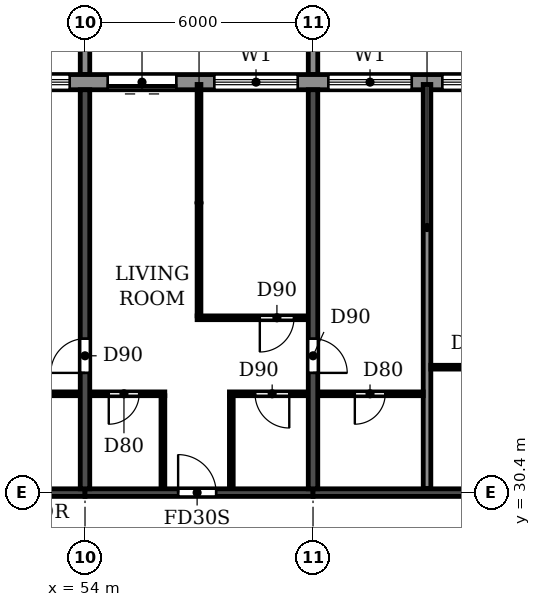
"""IFC4 building model, lengths in metres.
Left out: names, types, materials, properties, quantities, classifications, styles, units other than length and angle.
Written with IfcOpenShell. Run it as: python <this file> out.ifc"""

import sys

from ifc_helpers import new_model, si_unit, direction, frame, frame_2d, origin, place, context, subcontext, project, spatial, polyline, rectangle, outline, extrude, source, transform, mapped, element, fill, save


model = new_model("IFC4")
c1 = context("Model", 3, precision=1e-05, world=origin(), true_north=direction((0.0, 1.0)))
c2 = subcontext(c1, "Body", "Model", "MODEL_VIEW")
j1 = project(units=[si_unit("LENGTHUNIT", "METRE"), si_unit("PLANEANGLEUNIT", "RADIAN")], contexts=[c1])
p1 = place(None, origin())
s1 = spatial("IfcSite", under=j1, at=p1, CompositionType="ELEMENT")
p2 = place(p1, origin())
s2 = spatial("IfcBuilding", under=s1, at=p2, CompositionType="ELEMENT")
p3 = place(p2, frame((0.0, 0.0, 191.7)))
s3 = spatial("IfcBuildingStorey", under=s2, at=p3, CompositionType="ELEMENT", Elevation=191.7)
p4 = place(p3, frame((54.0, 30.5, 0.0), z_axis=(0.0, 0.0, 1.0), x_axis=(0.0, 1.0, 0.0)))
e1 = element("IfcWall", 1, at=p4, inside=s3, PredefinedType="SHEAR", context=c2, shape_type="SweptSolid", body=[
    extrude(rectangle(XDim=10.5, YDim=0.25, at=frame_2d((5.25, 0.0))), origin(), (0.0, 0.0, 1.0), 3.08),
])
p5 = place(p4, frame((3.05, 0.0, 0.0)))
e2 = element("IfcOpeningElement", 2, at=p5, cuts=e1, PredefinedType="OPENING", context=c2, shape_type="SweptSolid", body=[
    extrude(rectangle(XDim=0.9, YDim=2.1, at=frame_2d((0.45, 1.05))), frame((0.0, 0.135, 0.0), z_axis=(0.0, -1.0, 0.0), x_axis=(1.0, 0.0, 0.0)), (0.0, 0.0, 1.0), 0.27),
])
p6 = place(p3, frame((60.0, 30.5, 0.0), z_axis=(0.0, 0.0, 1.0), x_axis=(0.0, 1.0, 0.0)))
e3 = element("IfcWall", 3, at=p6, inside=s3, PredefinedType="SHEAR", context=c2, shape_type="SweptSolid", body=[
    extrude(rectangle(XDim=10.5, YDim=0.25, at=frame_2d((5.25, 0.0))), origin(), (0.0, 0.0, 1.0), 3.08),
])
p7 = place(p6, frame((3.05, 0.0, 0.0)))
e4 = element("IfcOpeningElement", 4, at=p7, cuts=e3, PredefinedType="OPENING", context=c2, shape_type="SweptSolid", body=[
    extrude(rectangle(XDim=0.9, YDim=2.1, at=frame_2d((0.45, 1.05))), frame((0.0, 0.135, 0.0), z_axis=(0.0, -1.0, 0.0), x_axis=(1.0, 0.0, 0.0)), (0.0, 0.0, 1.0), 0.27),
])
p8 = place(p3, frame((48.0, 30.4, 0.0), z_axis=(0.0, 0.0, 1.0), x_axis=(1.0, 0.0, 0.0)))
e5 = element("IfcWall", 5, at=p8, inside=s3, PredefinedType="SHEAR", context=c2, shape_type="SweptSolid", body=[
    extrude(rectangle(XDim=6.0, YDim=0.2, at=frame_2d((3.0, 0.0))), origin(), (0.0, 0.0, 1.0), 2.48),
])
p9 = place(p3, frame((54.0, 30.4, 0.0), z_axis=(0.0, 0.0, 1.0), x_axis=(1.0, 0.0, 0.0)))
e6 = element("IfcWall", 6, at=p9, inside=s3, PredefinedType="SHEAR", context=c2, shape_type="SweptSolid", body=[
    extrude(rectangle(XDim=6.0, YDim=0.2, at=frame_2d((3.0, 0.0))), origin(), (0.0, 0.0, 1.0), 2.48),
])
p10 = place(p9, frame((2.45, 0.0, 0.0)))
e7 = element("IfcOpeningElement", 7, at=p10, cuts=e6, PredefinedType="OPENING", context=c2, shape_type="SweptSolid", body=[
    extrude(rectangle(XDim=1.0, YDim=2.1, at=frame_2d((0.5, 1.05))), frame((0.0, 0.11, 0.0), z_axis=(0.0, -1.0, 0.0), x_axis=(1.0, 0.0, 0.0)), (0.0, 0.0, 1.0), 0.22),
])
p11 = place(p3, frame((60.0, 30.4, 0.0), z_axis=(0.0, 0.0, 1.0), x_axis=(1.0, 0.0, 0.0)))
e8 = element("IfcWall", 8, at=p11, inside=s3, PredefinedType="SHEAR", context=c2, shape_type="SweptSolid", body=[
    extrude(rectangle(XDim=6.0, YDim=0.2, at=frame_2d((3.0, 0.0))), origin(), (0.0, 0.0, 1.0), 2.48),
])
p12 = place(p3, frame((79.317, 41.2, 0.0), z_axis=(0.0, 0.0, 1.0), x_axis=(-1.0, 0.0, 0.0)))
e9 = element("IfcWall", 9, at=p12, inside=s3, PredefinedType="STANDARD", context=c2, shape_type="SweptSolid", body=[
    extrude(rectangle(XDim=56.634, YDim=0.4, at=frame_2d((28.317, 0.0))), origin(), (0.0, 0.0, 1.0), 3.08),
])
p13 = place(p12, frame((52.917, 0.0, 0.0)))
e10 = element("IfcOpeningElement", 10, at=p13, cuts=e9, PredefinedType="OPENING", context=c2, shape_type="SweptSolid", body=[
    extrude(rectangle(XDim=1.8, YDim=2.4, at=frame_2d((0.9, 1.2))), frame((0.0, 0.21, 0.0), z_axis=(0.0, -1.0, 0.0), x_axis=(1.0, 0.0, 0.0)), (0.0, 0.0, 1.0), 0.42),
])
p14 = place(p12, frame((49.717, 0.0, 0.9)))
e11 = element("IfcOpeningElement", 11, at=p14, cuts=e9, PredefinedType="OPENING", context=c2, shape_type="SweptSolid", body=[
    extrude(rectangle(XDim=2.2, YDim=1.5, at=frame_2d((1.1, 0.75))), frame((0.0, 0.21, 0.0), z_axis=(0.0, -1.0, 0.0), x_axis=(1.0, 0.0, 0.0)), (0.0, 0.0, 1.0), 0.42),
])
p15 = place(p12, frame((46.917, 0.0, 0.0)))
e12 = element("IfcOpeningElement", 12, at=p15, cuts=e9, PredefinedType="OPENING", context=c2, shape_type="SweptSolid", body=[
    extrude(rectangle(XDim=1.8, YDim=2.4, at=frame_2d((0.9, 1.2))), frame((0.0, 0.21, 0.0), z_axis=(0.0, -1.0, 0.0), x_axis=(1.0, 0.0, 0.0)), (0.0, 0.0, 1.0), 0.42),
])
p16 = place(p12, frame((43.717, 0.0, 0.9)))
e13 = element("IfcOpeningElement", 13, at=p16, cuts=e9, PredefinedType="OPENING", context=c2, shape_type="SweptSolid", body=[
    extrude(rectangle(XDim=2.2, YDim=1.5, at=frame_2d((1.1, 0.75))), frame((0.0, 0.21, 0.0), z_axis=(0.0, -1.0, 0.0), x_axis=(1.0, 0.0, 0.0)), (0.0, 0.0, 1.0), 0.42),
])
p17 = place(p12, frame((40.717, 0.0, 0.9)))
e14 = element("IfcOpeningElement", 14, at=p17, cuts=e9, PredefinedType="OPENING", context=c2, shape_type="SweptSolid", body=[
    extrude(rectangle(XDim=2.2, YDim=1.5, at=frame_2d((1.1, 0.75))), frame((0.0, 0.21, 0.0), z_axis=(0.0, -1.0, 0.0), x_axis=(1.0, 0.0, 0.0)), (0.0, 0.0, 1.0), 0.42),
])
p18 = place(p12, frame((37.717, 0.0, 0.9)))
e15 = element("IfcOpeningElement", 15, at=p18, cuts=e9, PredefinedType="OPENING", context=c2, shape_type="SweptSolid", body=[
    extrude(rectangle(XDim=2.2, YDim=1.5, at=frame_2d((1.1, 0.75))), frame((0.0, 0.21, 0.0), z_axis=(0.0, -1.0, 0.0), x_axis=(1.0, 0.0, 0.0)), (0.0, 0.0, 1.0), 0.42),
])
p19 = place(p12, frame((34.917, 0.0, 0.0)))
e16 = element("IfcOpeningElement", 16, at=p19, cuts=e9, PredefinedType="OPENING", context=c2, shape_type="SweptSolid", body=[
    extrude(rectangle(XDim=1.8, YDim=2.4, at=frame_2d((0.9, 1.2))), frame((0.0, 0.21, 0.0), z_axis=(0.0, -1.0, 0.0), x_axis=(1.0, 0.0, 0.0)), (0.0, 0.0, 1.0), 0.42),
])
p20 = place(p12, frame((31.717, 0.0, 0.9)))
e17 = element("IfcOpeningElement", 17, at=p20, cuts=e9, PredefinedType="OPENING", context=c2, shape_type="SweptSolid", body=[
    extrude(rectangle(XDim=2.2, YDim=1.5, at=frame_2d((1.1, 0.75))), frame((0.0, 0.21, 0.0), z_axis=(0.0, -1.0, 0.0), x_axis=(1.0, 0.0, 0.0)), (0.0, 0.0, 1.0), 0.42),
])
p21 = place(p12, frame((28.717, 0.0, 0.9)))
e18 = element("IfcOpeningElement", 18, at=p21, cuts=e9, PredefinedType="OPENING", context=c2, shape_type="SweptSolid", body=[
    extrude(rectangle(XDim=2.2, YDim=1.5, at=frame_2d((1.1, 0.75))), frame((0.0, 0.21, 0.0), z_axis=(0.0, -1.0, 0.0), x_axis=(1.0, 0.0, 0.0)), (0.0, 0.0, 1.0), 0.42),
])
p22 = place(p12, frame((25.717, 0.0, 0.9)))
e19 = element("IfcOpeningElement", 19, at=p22, cuts=e9, PredefinedType="OPENING", context=c2, shape_type="SweptSolid", body=[
    extrude(rectangle(XDim=2.2, YDim=1.5, at=frame_2d((1.1, 0.75))), frame((0.0, 0.21, 0.0), z_axis=(0.0, -1.0, 0.0), x_axis=(1.0, 0.0, 0.0)), (0.0, 0.0, 1.0), 0.42),
])
p23 = place(p12, frame((22.917, 0.0, 0.0)))
e20 = element("IfcOpeningElement", 20, at=p23, cuts=e9, PredefinedType="OPENING", context=c2, shape_type="SweptSolid", body=[
    extrude(rectangle(XDim=1.8, YDim=2.4, at=frame_2d((0.9, 1.2))), frame((0.0, 0.21, 0.0), z_axis=(0.0, -1.0, 0.0), x_axis=(1.0, 0.0, 0.0)), (0.0, 0.0, 1.0), 0.42),
])
p24 = place(p12, frame((19.717, 0.0, 0.9)))
e21 = element("IfcOpeningElement", 21, at=p24, cuts=e9, PredefinedType="OPENING", context=c2, shape_type="SweptSolid", body=[
    extrude(rectangle(XDim=2.2, YDim=1.5, at=frame_2d((1.1, 0.75))), frame((0.0, 0.21, 0.0), z_axis=(0.0, -1.0, 0.0), x_axis=(1.0, 0.0, 0.0)), (0.0, 0.0, 1.0), 0.42),
])
p25 = place(p12, frame((16.717, 0.0, 0.9)))
e22 = element("IfcOpeningElement", 22, at=p25, cuts=e9, PredefinedType="OPENING", context=c2, shape_type="SweptSolid", body=[
    extrude(rectangle(XDim=2.2, YDim=1.5, at=frame_2d((1.1, 0.75))), frame((0.0, 0.21, 0.0), z_axis=(0.0, -1.0, 0.0), x_axis=(1.0, 0.0, 0.0)), (0.0, 0.0, 1.0), 0.42),
])
p26 = place(p12, frame((13.717, 0.0, 0.9)))
e23 = element("IfcOpeningElement", 23, at=p26, cuts=e9, PredefinedType="OPENING", context=c2, shape_type="SweptSolid", body=[
    extrude(rectangle(XDim=2.2, YDim=1.5, at=frame_2d((1.1, 0.75))), frame((0.0, 0.21, 0.0), z_axis=(0.0, -1.0, 0.0), x_axis=(1.0, 0.0, 0.0)), (0.0, 0.0, 1.0), 0.42),
])
p27 = place(p12, frame((10.717, 0.0, 0.9)))
e24 = element("IfcOpeningElement", 24, at=p27, cuts=e9, PredefinedType="OPENING", context=c2, shape_type="SweptSolid", body=[
    extrude(rectangle(XDim=2.2, YDim=1.5, at=frame_2d((1.1, 0.75))), frame((0.0, 0.21, 0.0), z_axis=(0.0, -1.0, 0.0), x_axis=(1.0, 0.0, 0.0)), (0.0, 0.0, 1.0), 0.42),
])
p28 = place(p12, frame((7.917, 0.0, 0.0)))
e25 = element("IfcOpeningElement", 25, at=p28, cuts=e9, PredefinedType="OPENING", context=c2, shape_type="SweptSolid", body=[
    extrude(rectangle(XDim=1.8, YDim=2.4, at=frame_2d((0.9, 1.2))), frame((0.0, 0.21, 0.0), z_axis=(0.0, -1.0, 0.0), x_axis=(1.0, 0.0, 0.0)), (0.0, 0.0, 1.0), 0.42),
])
p29 = place(p12, frame((4.717, 0.0, 0.9)))
e26 = element("IfcOpeningElement", 26, at=p29, cuts=e9, PredefinedType="OPENING", context=c2, shape_type="SweptSolid", body=[
    extrude(rectangle(XDim=2.2, YDim=1.5, at=frame_2d((1.1, 0.75))), frame((0.0, 0.21, 0.0), z_axis=(0.0, -1.0, 0.0), x_axis=(1.0, 0.0, 0.0)), (0.0, 0.0, 1.0), 0.42),
])
p30 = place(p12, frame((1.917, 0.0, 0.0)))
e27 = element("IfcOpeningElement", 27, at=p30, cuts=e9, PredefinedType="OPENING", context=c2, shape_type="SweptSolid", body=[
    extrude(rectangle(XDim=1.8, YDim=2.4, at=frame_2d((0.9, 1.2))), frame((0.0, 0.21, 0.0), z_axis=(0.0, -1.0, 0.0), x_axis=(1.0, 0.0, 0.0)), (0.0, 0.0, 1.0), 0.42),
])
m1 = source(origin(), c2, "Body", "SweptSolid", [
    extrude(outline(polyline([(0.0, 0.0), (0.25, 0.0), (0.25, 3.1), (0.0, 3.1), (0.0, 0.0)])), origin(), (0.0, 0.0, 1.0), 3.1),
])
for number, where in (
    (28, (53.875, 41.4, 0.0)),
    (29, (59.875, 41.4, 0.0)),
):
    element("IfcWall", number, at=place(p3, frame(where)), inside=s3, PredefinedType="STANDARD", context=c2, shape_type="MappedRepresentation", body=[
        mapped(m1, transform((0.0, 0.0, 0.0))),
    ])
p31 = place(p3, frame((63.0, 30.51, 0.0), z_axis=(0.0, 0.0, 1.0), x_axis=(0.0, 1.0, 0.0)))
e30 = element("IfcWall", 30, at=p31, inside=s3, PredefinedType="PARTITIONING", context=c2, shape_type="SweptSolid", body=[
    extrude(rectangle(XDim=10.63, YDim=0.2, at=frame_2d((5.315, 0.0))), origin(), (0.0, 0.0, 1.0), 3.08),
])
p32 = place(p3, frame((48.135, 33.0, 0.0), z_axis=(0.0, 0.0, 1.0), x_axis=(1.0, 0.0, 0.0)))
e31 = element("IfcWall", 31, at=p32, inside=s3, PredefinedType="PARTITIONING", context=c2, shape_type="SweptSolid", body=[
    extrude(rectangle(XDim=5.73, YDim=0.1, at=frame_2d((2.865, 0.0))), origin(), (0.0, 0.0, 1.0), 3.08),
])
p33 = place(p32, frame((0.965, 0.0, 0.0)))
e32 = element("IfcOpeningElement", 32, at=p33, cuts=e31, PredefinedType="OPENING", context=c2, shape_type="SweptSolid", body=[
    extrude(rectangle(XDim=0.8, YDim=2.1, at=frame_2d((0.4, 1.05))), frame((0.0, 0.06, 0.0), z_axis=(0.0, -1.0, 0.0), x_axis=(1.0, 0.0, 0.0)), (0.0, 0.0, 1.0), 0.12),
])
p34 = place(p32, frame((3.965, 0.0, 0.0)))
e33 = element("IfcOpeningElement", 33, at=p34, cuts=e31, PredefinedType="OPENING", context=c2, shape_type="SweptSolid", body=[
    extrude(rectangle(XDim=0.8, YDim=2.1, at=frame_2d((0.4, 1.05))), frame((0.0, 0.06, 0.0), z_axis=(0.0, -1.0, 0.0), x_axis=(1.0, 0.0, 0.0)), (0.0, 0.0, 1.0), 0.12),
])
p35 = place(p3, frame((54.135, 33.0, 0.0), z_axis=(0.0, 0.0, 1.0), x_axis=(1.0, 0.0, 0.0)))
e34 = element("IfcWall", 34, at=p35, inside=s3, PredefinedType="PARTITIONING", context=c2, shape_type="SweptSolid", body=[
    extrude(rectangle(XDim=1.965, YDim=0.1, at=frame_2d((0.982, 0.0))), origin(), (0.0, 0.0, 1.0), 3.08),
])
p36 = place(p35, frame((0.49, 0.0, 0.0)))
e35 = element("IfcOpeningElement", 35, at=p36, cuts=e34, PredefinedType="OPENING", context=c2, shape_type="SweptSolid", body=[
    extrude(rectangle(XDim=0.8, YDim=2.1, at=frame_2d((0.4, 1.05))), frame((0.0, 0.06, 0.0), z_axis=(0.0, -1.0, 0.0), x_axis=(1.0, 0.0, 0.0)), (0.0, 0.0, 1.0), 0.12),
])
p37 = place(p3, frame((57.8, 33.0, 0.0), z_axis=(0.0, 0.0, 1.0), x_axis=(1.0, 0.0, 0.0)))
e36 = element("IfcWall", 36, at=p37, inside=s3, PredefinedType="PARTITIONING", context=c2, shape_type="SweptSolid", body=[
    extrude(rectangle(XDim=2.065, YDim=0.1, at=frame_2d((1.032, 0.0))), origin(), (0.0, 0.0, 1.0), 3.08),
])
p38 = place(p37, frame((0.675, 0.0, 0.0)))
e37 = element("IfcOpeningElement", 37, at=p38, cuts=e36, PredefinedType="OPENING", context=c2, shape_type="SweptSolid", body=[
    extrude(rectangle(XDim=0.9, YDim=2.1, at=frame_2d((0.45, 1.05))), frame((0.0, 0.06, 0.0), z_axis=(0.0, -1.0, 0.0), x_axis=(1.0, 0.0, 0.0)), (0.0, 0.0, 1.0), 0.12),
])
p39 = place(p3, frame((60.135, 33.0, 0.0), z_axis=(0.0, 0.0, 1.0), x_axis=(1.0, 0.0, 0.0)))
e38 = element("IfcWall", 38, at=p39, inside=s3, PredefinedType="PARTITIONING", context=c2, shape_type="SweptSolid", body=[
    extrude(rectangle(XDim=2.765, YDim=0.1, at=frame_2d((1.382, 0.0))), origin(), (0.0, 0.0, 1.0), 3.08),
])
p40 = place(p39, frame((0.965, 0.0, 0.0)))
e39 = element("IfcOpeningElement", 39, at=p40, cuts=e38, PredefinedType="OPENING", context=c2, shape_type="SweptSolid", body=[
    extrude(rectangle(XDim=0.8, YDim=2.1, at=frame_2d((0.4, 1.05))), frame((0.0, 0.06, 0.0), z_axis=(0.0, -1.0, 0.0), x_axis=(1.0, 0.0, 0.0)), (0.0, 0.0, 1.0), 0.12),
])
p41 = place(p3, frame((63.1, 33.7, 0.0), z_axis=(0.0, 0.0, 1.0), x_axis=(1.0, 0.0, 0.0)))
e40 = element("IfcWall", 40, at=p41, inside=s3, PredefinedType="PARTITIONING", context=c2, shape_type="SweptSolid", body=[
    extrude(rectangle(XDim=2.765, YDim=0.1, at=frame_2d((1.382, 0.0))), origin(), (0.0, 0.0, 1.0), 3.08),
])
p42 = place(p41, frame((1.0, 0.0, 0.0)))
e41 = element("IfcOpeningElement", 41, at=p42, cuts=e40, PredefinedType="OPENING", context=c2, shape_type="SweptSolid", body=[
    extrude(rectangle(XDim=0.8, YDim=2.1, at=frame_2d((0.4, 1.05))), frame((0.0, 0.06, 0.0), z_axis=(0.0, -1.0, 0.0), x_axis=(1.0, 0.0, 0.0)), (0.0, 0.0, 1.0), 0.12),
])
p43 = place(p3, frame((56.95, 35.0, 0.0), z_axis=(0.0, 0.0, 1.0), x_axis=(1.0, 0.0, 0.0)))
e42 = element("IfcWall", 42, at=p43, inside=s3, PredefinedType="PARTITIONING", context=c2, shape_type="SweptSolid", body=[
    extrude(rectangle(XDim=2.915, YDim=0.1, at=frame_2d((1.458, 0.0))), origin(), (0.0, 0.0, 1.0), 3.08),
])
p44 = place(p43, frame((1.65, 0.0, 0.0)))
e43 = element("IfcOpeningElement", 43, at=p44, cuts=e42, PredefinedType="OPENING", context=c2, shape_type="SweptSolid", body=[
    extrude(rectangle(XDim=0.9, YDim=2.1, at=frame_2d((0.45, 1.05))), frame((0.0, 0.06, 0.0), z_axis=(0.0, -1.0, 0.0), x_axis=(1.0, 0.0, 0.0)), (0.0, 0.0, 1.0), 0.12),
])
p45 = place(p3, frame((56.05, 30.51, 0.0), z_axis=(0.0, 0.0, 1.0), x_axis=(0.0, 1.0, 0.0)))
e44 = element("IfcWall", 44, at=p45, inside=s3, PredefinedType="PARTITIONING", context=c2, shape_type="SweptSolid", body=[
    extrude(rectangle(XDim=2.44, YDim=0.1, at=frame_2d((1.22, 0.0))), origin(), (0.0, 0.0, 1.0), 3.08),
])
p46 = place(p3, frame((57.0, 35.05, 0.0), z_axis=(0.0, 0.0, 1.0), x_axis=(0.0, 1.0, 0.0)))
e45 = element("IfcWall", 45, at=p46, inside=s3, PredefinedType="PARTITIONING", context=c2, shape_type="SweptSolid", body=[
    extrude(rectangle(XDim=6.09, YDim=0.1, at=frame_2d((3.045, 0.0))), origin(), (0.0, 0.0, 1.0), 3.08),
])
p47 = place(p3, frame((57.85, 30.51, 0.0), z_axis=(0.0, 0.0, 1.0), x_axis=(0.0, 1.0, 0.0)))
e46 = element("IfcWall", 46, at=p47, inside=s3, PredefinedType="PARTITIONING", context=c2, shape_type="SweptSolid", body=[
    extrude(rectangle(XDim=2.44, YDim=0.1, at=frame_2d((1.22, 0.0))), origin(), (0.0, 0.0, 1.0), 3.08),
])
p48 = place(p22, origin())
e47 = element("IfcWindow", 47, at=p48, inside=s3, PartitioningType="DOUBLE_PANEL_HORIZONTAL", PredefinedType="WINDOW", context=c2, shape_type="SweptSolid", body=[
    extrude(rectangle(XDim=2.2, YDim=1.5, at=frame_2d((1.1, 0.75))), frame((0.0, 0.03, 0.0), z_axis=(0.0, -1.0, 0.0), x_axis=(1.0, 0.0, 0.0)), (0.0, 0.0, 1.0), 0.06),
])
fill(e19, e47)
p49 = place(p23, origin())
e48 = element("IfcDoor", 48, at=p49, inside=s3, OperationType="DOUBLE_DOOR_SLIDING", PredefinedType="DOOR", context=c2, shape_type="SweptSolid", body=[
    extrude(rectangle(XDim=1.8, YDim=2.4, at=frame_2d((0.9, 1.2))), frame((0.0, 0.025, 0.0), z_axis=(0.0, -1.0, 0.0), x_axis=(1.0, 0.0, 0.0)), (0.0, 0.0, 1.0), 0.05),
])
fill(e20, e48)
p50 = place(p24, origin())
e49 = element("IfcWindow", 49, at=p50, inside=s3, PartitioningType="DOUBLE_PANEL_HORIZONTAL", PredefinedType="WINDOW", context=c2, shape_type="SweptSolid", body=[
    extrude(rectangle(XDim=2.2, YDim=1.5, at=frame_2d((1.1, 0.75))), frame((0.0, 0.03, 0.0), z_axis=(0.0, -1.0, 0.0), x_axis=(1.0, 0.0, 0.0)), (0.0, 0.0, 1.0), 0.06),
])
fill(e21, e49)
p51 = place(p25, origin())
e50 = element("IfcWindow", 50, at=p51, inside=s3, PartitioningType="DOUBLE_PANEL_HORIZONTAL", PredefinedType="WINDOW", context=c2, shape_type="SweptSolid", body=[
    extrude(rectangle(XDim=2.2, YDim=1.5, at=frame_2d((1.1, 0.75))), frame((0.0, 0.03, 0.0), z_axis=(0.0, -1.0, 0.0), x_axis=(1.0, 0.0, 0.0)), (0.0, 0.0, 1.0), 0.06),
])
fill(e22, e50)
p52 = place(p26, origin())
e51 = element("IfcWindow", 51, at=p52, inside=s3, PartitioningType="DOUBLE_PANEL_HORIZONTAL", PredefinedType="WINDOW", context=c2, shape_type="SweptSolid", body=[
    extrude(rectangle(XDim=2.2, YDim=1.5, at=frame_2d((1.1, 0.75))), frame((0.0, 0.03, 0.0), z_axis=(0.0, -1.0, 0.0), x_axis=(1.0, 0.0, 0.0)), (0.0, 0.0, 1.0), 0.06),
])
fill(e23, e51)
p53 = place(p40, frame((0.8, 0.0, 0.0), z_axis=(0.0, 0.0, 1.0), x_axis=(-1.0, 0.0, 0.0)))
e52 = element("IfcDoor", 52, at=p53, inside=s3, OperationType="SINGLE_SWING_RIGHT", PredefinedType="DOOR", context=c2, shape_type="SweptSolid", body=[
    extrude(rectangle(XDim=0.8, YDim=2.1, at=frame_2d((0.4, 1.05))), frame((0.0, 0.025, 0.0), z_axis=(0.0, -1.0, 0.0), x_axis=(1.0, 0.0, 0.0)), (0.0, 0.0, 1.0), 0.05),
])
fill(e39, e52)
p54 = place(p5, origin())
e53 = element("IfcDoor", 53, at=p54, inside=s3, OperationType="SINGLE_SWING_LEFT", PredefinedType="DOOR", context=c2, shape_type="SweptSolid", body=[
    extrude(rectangle(XDim=0.9, YDim=2.1, at=frame_2d((0.45, 1.05))), frame((0.0, 0.025, 0.0), z_axis=(0.0, -1.0, 0.0), x_axis=(1.0, 0.0, 0.0)), (0.0, 0.0, 1.0), 0.05),
])
fill(e2, e53)
p55 = place(p36, frame((0.8, 0.0, 0.0), z_axis=(0.0, 0.0, 1.0), x_axis=(-1.0, 0.0, 0.0)))
e54 = element("IfcDoor", 54, at=p55, inside=s3, OperationType="SINGLE_SWING_RIGHT", PredefinedType="DOOR", context=c2, shape_type="SweptSolid", body=[
    extrude(rectangle(XDim=0.8, YDim=2.1, at=frame_2d((0.4, 1.05))), frame((0.0, 0.025, 0.0), z_axis=(0.0, -1.0, 0.0), x_axis=(1.0, 0.0, 0.0)), (0.0, 0.0, 1.0), 0.05),
])
fill(e35, e54)
p56 = place(p10, origin())
e55 = element("IfcDoor", 55, at=p56, inside=s3, OperationType="SINGLE_SWING_LEFT", PredefinedType="DOOR", context=c2, shape_type="SweptSolid", body=[
    extrude(rectangle(XDim=1.0, YDim=2.1, at=frame_2d((0.5, 1.05))), frame((0.0, 0.025, 0.0), z_axis=(0.0, -1.0, 0.0), x_axis=(1.0, 0.0, 0.0)), (0.0, 0.0, 1.0), 0.05),
])
fill(e7, e55)
p57 = place(p38, frame((0.9, 0.0, 0.0), z_axis=(0.0, 0.0, 1.0), x_axis=(-1.0, 0.0, 0.0)))
e56 = element("IfcDoor", 56, at=p57, inside=s3, OperationType="SINGLE_SWING_LEFT", PredefinedType="DOOR", context=c2, shape_type="SweptSolid", body=[
    extrude(rectangle(XDim=0.9, YDim=2.1, at=frame_2d((0.45, 1.05))), frame((0.0, 0.025, 0.0), z_axis=(0.0, -1.0, 0.0), x_axis=(1.0, 0.0, 0.0)), (0.0, 0.0, 1.0), 0.05),
])
fill(e37, e56)
p58 = place(p44, frame((0.9, 0.0, 0.0), z_axis=(0.0, 0.0, 1.0), x_axis=(-1.0, 0.0, 0.0)))
e57 = element("IfcDoor", 57, at=p58, inside=s3, OperationType="SINGLE_SWING_RIGHT", PredefinedType="DOOR", context=c2, shape_type="SweptSolid", body=[
    extrude(rectangle(XDim=0.9, YDim=2.1, at=frame_2d((0.45, 1.05))), frame((0.0, 0.025, 0.0), z_axis=(0.0, -1.0, 0.0), x_axis=(1.0, 0.0, 0.0)), (0.0, 0.0, 1.0), 0.05),
])
fill(e43, e57)
p59 = place(p7, frame((0.9, 0.0, 0.0), z_axis=(0.0, 0.0, 1.0), x_axis=(-1.0, 0.0, 0.0)))
e58 = element("IfcDoor", 58, at=p59, inside=s3, OperationType="SINGLE_SWING_RIGHT", PredefinedType="DOOR", context=c2, shape_type="SweptSolid", body=[
    extrude(rectangle(XDim=0.9, YDim=2.1, at=frame_2d((0.45, 1.05))), frame((0.0, 0.025, 0.0), z_axis=(0.0, -1.0, 0.0), x_axis=(1.0, 0.0, 0.0)), (0.0, 0.0, 1.0), 0.05),
])
fill(e4, e58)
save(model, sys.argv[1])
